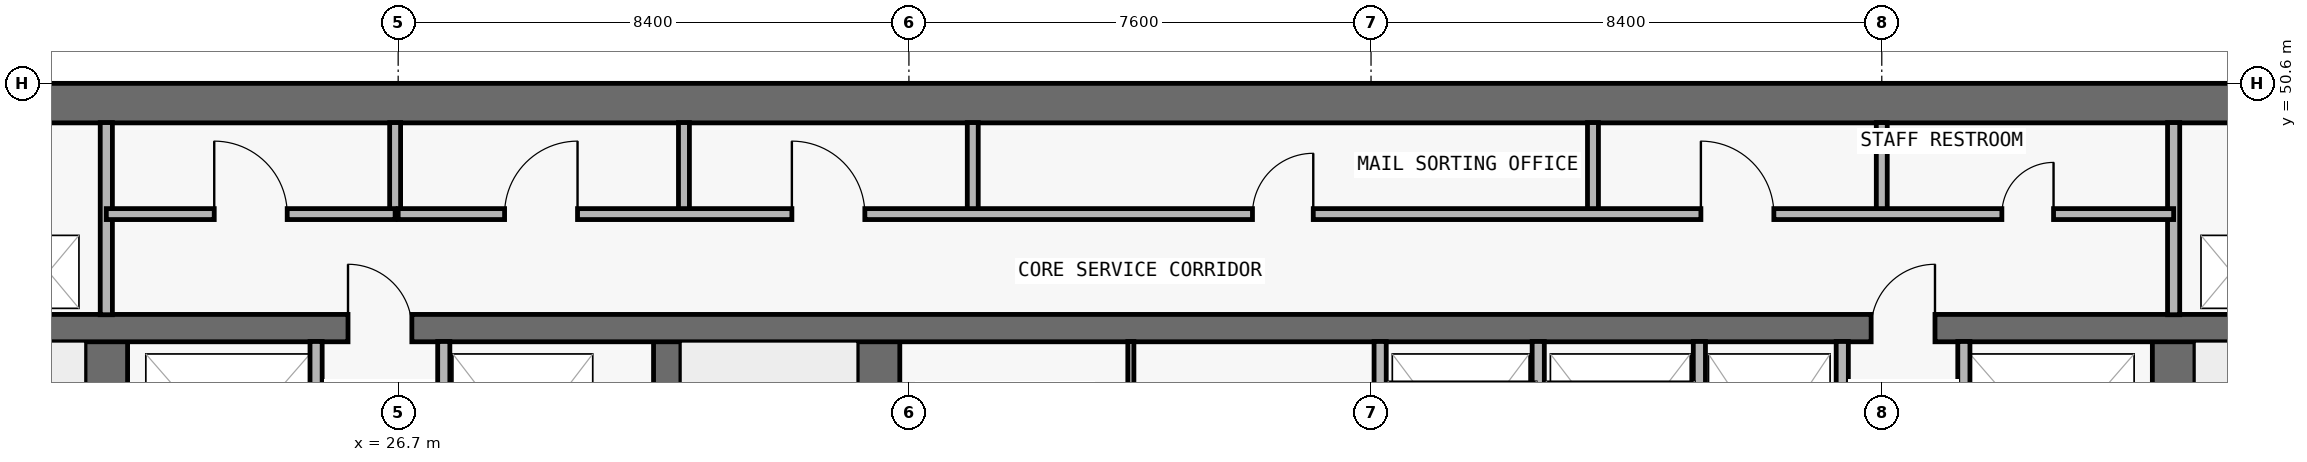
"""IFC4 building model, lengths in metres.
Left out: names, types, materials, properties, quantities, classifications, styles, units other than length and angle.
Written with IfcOpenShell. Run it as: python <this file> out.ifc"""

import sys

from ifc_helpers import new_model, si_unit, direction, frame, frame_2d, origin, place, context, subcontext, project, spatial, rectangle, extrude, element, fill, save


model = new_model("IFC4")
c1 = context("Model", 3, precision=1e-05, world=origin(), true_north=direction((0.0, 1.0)))
c2 = subcontext(c1, "Body", "Model", "MODEL_VIEW")
j1 = project(units=[si_unit("LENGTHUNIT", "METRE"), si_unit("PLANEANGLEUNIT", "RADIAN")], contexts=[c1])
p1 = place(None, origin())
s1 = spatial("IfcSite", under=j1, at=p1, CompositionType="ELEMENT")
p2 = place(p1, origin())
s2 = spatial("IfcBuilding", under=s1, at=p2, CompositionType="ELEMENT")
p3 = place(p2, frame((0.0, 0.0, 148.8)))
s3 = spatial("IfcBuildingStorey", under=s2, at=p3, CompositionType="ELEMENT", Elevation=148.8)
p4 = place(p3, frame((17.85, 50.275, 0.0), z_axis=(0.0, 0.0, 1.0), x_axis=(1.0, 0.0, 0.0)))
e1 = element("IfcWall", 1, at=p4, inside=s3, PredefinedType="SHEAR", context=c2, shape_type="SweptSolid", body=[
    extrude(rectangle(XDim=42.1, YDim=0.65, at=frame_2d((21.05, 0.0))), origin(), (0.0, 0.0, 1.0), 3.0),
])
p5 = place(p3, frame((21.9, 36.95, 0.0), z_axis=(0.0, 0.0, 1.0), x_axis=(0.0, 1.0, 0.0)))
e2 = element("IfcWall", 2, at=p5, inside=s3, PredefinedType="SHEAR", context=c2, shape_type="SweptSolid", body=[
    extrude(rectangle(XDim=9.625, YDim=0.7, at=frame_2d((4.812, 0.0))), origin(), (0.0, 0.0, 1.0), 3.0),
])
p6 = place(p5, frame((0.6, 0.0, 0.0)))
e3 = element("IfcOpeningElement", 3, at=p6, cuts=e2, PredefinedType="OPENING", context=c2, shape_type="SweptSolid", body=[
    extrude(rectangle(XDim=1.1, YDim=2.15, at=frame_2d((0.55, 1.075))), frame((0.0, 0.36, 0.0), z_axis=(0.0, -1.0, 0.0), x_axis=(1.0, 0.0, 0.0)), (0.0, 0.0, 1.0), 0.72),
])
p7 = place(p3, frame((55.9, 36.95, 0.0), z_axis=(0.0, 0.0, 1.0), x_axis=(0.0, 1.0, 0.0)))
e4 = element("IfcWall", 4, at=p7, inside=s3, PredefinedType="SHEAR", context=c2, shape_type="SweptSolid", body=[
    extrude(rectangle(XDim=9.625, YDim=0.7, at=frame_2d((4.812, 0.0))), origin(), (0.0, 0.0, 1.0), 3.0),
])
p8 = place(p7, frame((0.6, 0.0, 0.0)))
e5 = element("IfcOpeningElement", 5, at=p8, cuts=e4, PredefinedType="OPENING", context=c2, shape_type="SweptSolid", body=[
    extrude(rectangle(XDim=1.1, YDim=2.15, at=frame_2d((0.55, 1.075))), frame((0.0, 0.36, 0.0), z_axis=(0.0, -1.0, 0.0), x_axis=(1.0, 0.0, 0.0)), (0.0, 0.0, 1.0), 0.72),
])
p9 = place(p3, frame((31.125, 36.95, 0.0), z_axis=(0.0, 0.0, 1.0), x_axis=(0.0, 1.0, 0.0)))
e6 = element("IfcWall", 6, at=p9, inside=s3, PredefinedType="SHEAR", context=c2, shape_type="SweptSolid", body=[
    extrude(rectangle(XDim=9.625, YDim=0.45, at=frame_2d((4.812, 0.0))), origin(), (0.0, 0.0, 1.0), 3.0),
])
p10 = place(p3, frame((34.6, 36.95, 0.0), z_axis=(0.0, 0.0, 1.0), x_axis=(0.0, 1.0, 0.0)))
e7 = element("IfcWall", 7, at=p10, inside=s3, PredefinedType="SHEAR", context=c2, shape_type="SweptSolid", body=[
    extrude(rectangle(XDim=9.625, YDim=0.7, at=frame_2d((4.812, 0.0))), origin(), (0.0, 0.0, 1.0), 3.0),
])
p11 = place(p3, frame((18.25, 46.575, 0.0), z_axis=(0.0, 0.0, 1.0), x_axis=(1.0, 0.0, 0.0)))
e8 = element("IfcWall", 8, at=p11, inside=s3, PredefinedType="SHEAR", context=c2, shape_type="SweptSolid", body=[
    extrude(rectangle(XDim=41.3, YDim=0.45, at=frame_2d((20.65, 0.0))), origin(), (0.0, 0.0, 1.0), 3.0),
])
p12 = place(p11, frame((7.625, 0.0, 0.0)))
e9 = element("IfcOpeningElement", 9, at=p12, cuts=e8, PredefinedType="OPENING", context=c2, shape_type="SweptSolid", body=[
    extrude(rectangle(XDim=1.05, YDim=2.15, at=frame_2d((0.525, 1.075))), frame((0.0, 0.235, 0.0), z_axis=(0.0, -1.0, 0.0), x_axis=(1.0, 0.0, 0.0)), (0.0, 0.0, 1.0), 0.47),
])
p13 = place(p11, frame((32.675, 0.0, 0.0)))
e10 = element("IfcOpeningElement", 10, at=p13, cuts=e8, PredefinedType="OPENING", context=c2, shape_type="SweptSolid", body=[
    extrude(rectangle(XDim=1.05, YDim=2.15, at=frame_2d((0.525, 1.075))), frame((0.0, 0.235, 0.0), z_axis=(0.0, -1.0, 0.0), x_axis=(1.0, 0.0, 0.0)), (0.0, 0.0, 1.0), 0.47),
])
p14 = place(p3, frame((21.9, 46.795, 0.0), z_axis=(0.0, 0.0, 1.0), x_axis=(0.0, 1.0, 0.0)))
e11 = element("IfcWall", 11, at=p14, inside=s3, PredefinedType="PARTITIONING", context=c2, shape_type="SweptSolid", body=[
    extrude(rectangle(XDim=3.16, YDim=0.2, at=frame_2d((1.58, 0.0))), origin(), (0.0, 0.0, 1.0), 3.0),
])
p15 = place(p3, frame((25.35, 43.17, 0.0), z_axis=(0.0, 0.0, 1.0), x_axis=(0.0, 1.0, 0.0)))
e12 = element("IfcWall", 12, at=p15, inside=s3, PredefinedType="PARTITIONING", context=c2, shape_type="SweptSolid", body=[
    extrude(rectangle(XDim=3.185, YDim=0.2, at=frame_2d((1.593, 0.0))), origin(), (0.0, 0.0, 1.0), 3.0),
])
p16 = place(p3, frame((26.65, 48.45, 0.0), z_axis=(0.0, 0.0, 1.0), x_axis=(0.0, 1.0, 0.0)))
e13 = element("IfcWall", 13, at=p16, inside=s3, PredefinedType="PARTITIONING", context=c2, shape_type="SweptSolid", body=[
    extrude(rectangle(XDim=1.505, YDim=0.18, at=frame_2d((0.752, 0.0))), origin(), (0.0, 0.0, 1.0), 3.0),
])
p17 = place(p3, frame((27.45, 43.17, 0.0), z_axis=(0.0, 0.0, 1.0), x_axis=(0.0, 1.0, 0.0)))
e14 = element("IfcWall", 14, at=p17, inside=s3, PredefinedType="PARTITIONING", context=c2, shape_type="SweptSolid", body=[
    extrude(rectangle(XDim=3.185, YDim=0.2, at=frame_2d((1.593, 0.0))), origin(), (0.0, 0.0, 1.0), 3.0),
])
for number, where, z_axis, x_axis in (
    (15, (31.4, 48.45, 0.0), (0.0, 0.0, 1.0), (0.0, 1.0, 0.0)),
    (16, (36.15, 48.45, 0.0), (0.0, 0.0, 1.0), (0.0, 1.0, 0.0)),
):
    element("IfcWall", number, at=place(p3, frame(where, z_axis=z_axis, x_axis=x_axis)), inside=s3, PredefinedType="PARTITIONING", context=c2, shape_type="SweptSolid", body=[
        extrude(rectangle(XDim=1.505, YDim=0.18, at=frame_2d((0.752, 0.0))), origin(), (0.0, 0.0, 1.0), 3.0),
    ])
p18 = place(p3, frame((38.75, 43.17, 0.0), z_axis=(0.0, 0.0, 1.0), x_axis=(0.0, 1.0, 0.0)))
e17 = element("IfcWall", 17, at=p18, inside=s3, PredefinedType="MOVABLE", context=c2, shape_type="SweptSolid", body=[
    extrude(rectangle(XDim=3.185, YDim=0.1, at=frame_2d((1.593, 0.0))), origin(), (0.0, 0.0, 1.0), 3.0),
])
for number, where, z_axis, x_axis in (
    (18, (42.85, 43.17, 0.0), (0.0, 0.0, 1.0), (0.0, 1.0, 0.0)),
    (19, (45.45, 43.17, 0.0), (0.0, 0.0, 1.0), (0.0, 1.0, 0.0)),
):
    element("IfcWall", number, at=place(p3, frame(where, z_axis=z_axis, x_axis=x_axis)), inside=s3, PredefinedType="PARTITIONING", context=c2, shape_type="SweptSolid", body=[
        extrude(rectangle(XDim=3.185, YDim=0.2, at=frame_2d((1.593, 0.0))), origin(), (0.0, 0.0, 1.0), 3.0),
    ])
p19 = place(p3, frame((46.35, 48.45, 0.0), z_axis=(0.0, 0.0, 1.0), x_axis=(0.0, 1.0, 0.0)))
e20 = element("IfcWall", 20, at=p19, inside=s3, PredefinedType="PARTITIONING", context=c2, shape_type="SweptSolid", body=[
    extrude(rectangle(XDim=1.505, YDim=0.18, at=frame_2d((0.752, 0.0))), origin(), (0.0, 0.0, 1.0), 3.0),
])
for number, where, z_axis, x_axis in (
    (21, (48.1, 43.17, 0.0), (0.0, 0.0, 1.0), (0.0, 1.0, 0.0)),
    (22, (50.45, 43.17, 0.0), (0.0, 0.0, 1.0), (0.0, 1.0, 0.0)),
):
    element("IfcWall", number, at=place(p3, frame(where, z_axis=z_axis, x_axis=x_axis)), inside=s3, PredefinedType="PARTITIONING", context=c2, shape_type="SweptSolid", body=[
        extrude(rectangle(XDim=3.185, YDim=0.2, at=frame_2d((1.593, 0.0))), origin(), (0.0, 0.0, 1.0), 3.0),
    ])
p20 = place(p3, frame((51.1, 48.45, 0.0), z_axis=(0.0, 0.0, 1.0), x_axis=(0.0, 1.0, 0.0)))
e23 = element("IfcWall", 23, at=p20, inside=s3, PredefinedType="PARTITIONING", context=c2, shape_type="SweptSolid", body=[
    extrude(rectangle(XDim=1.505, YDim=0.18, at=frame_2d((0.752, 0.0))), origin(), (0.0, 0.0, 1.0), 3.0),
])
p21 = place(p3, frame((52.45, 43.17, 0.0), z_axis=(0.0, 0.0, 1.0), x_axis=(0.0, 1.0, 0.0)))
e24 = element("IfcWall", 24, at=p21, inside=s3, PredefinedType="PARTITIONING", context=c2, shape_type="SweptSolid", body=[
    extrude(rectangle(XDim=3.185, YDim=0.2, at=frame_2d((1.593, 0.0))), origin(), (0.0, 0.0, 1.0), 3.0),
])
p22 = place(p3, frame((55.9, 46.795, 0.0), z_axis=(0.0, 0.0, 1.0), x_axis=(0.0, 1.0, 0.0)))
e25 = element("IfcWall", 25, at=p22, inside=s3, PredefinedType="PARTITIONING", context=c2, shape_type="SweptSolid", body=[
    extrude(rectangle(XDim=3.16, YDim=0.2, at=frame_2d((1.58, 0.0))), origin(), (0.0, 0.0, 1.0), 3.0),
])
p23 = place(p3, frame((21.9, 48.45, 0.0), z_axis=(0.0, 0.0, 1.0), x_axis=(1.0, 0.0, 0.0)))
e26 = element("IfcWall", 26, at=p23, inside=s3, PredefinedType="PARTITIONING", context=c2, shape_type="SweptSolid", body=[
    extrude(rectangle(XDim=4.75, YDim=0.18, at=frame_2d((2.375, 0.0))), origin(), (0.0, 0.0, 1.0), 3.0),
])
p24 = place(p23, frame((1.775, 0.0, 0.0)))
e27 = element("IfcOpeningElement", 27, at=p24, cuts=e26, PredefinedType="OPENING", context=c2, shape_type="SweptSolid", body=[
    extrude(rectangle(XDim=1.2, YDim=2.2, at=frame_2d((0.6, 1.1))), frame((0.0, 0.1, 0.0), z_axis=(0.0, -1.0, 0.0), x_axis=(1.0, 0.0, 0.0)), (0.0, 0.0, 1.0), 0.2),
])
p25 = place(p3, frame((26.7, 48.45, 0.0), z_axis=(0.0, 0.0, 1.0), x_axis=(1.0, 0.0, 0.0)))
e28 = element("IfcWall", 28, at=p25, inside=s3, PredefinedType="PARTITIONING", context=c2, shape_type="SweptSolid", body=[
    extrude(rectangle(XDim=29.2, YDim=0.18, at=frame_2d((14.6, 0.0))), origin(), (0.0, 0.0, 1.0), 3.0),
])
p26 = place(p25, frame((1.75, 0.0, 0.0)))
e29 = element("IfcOpeningElement", 29, at=p26, cuts=e28, PredefinedType="OPENING", context=c2, shape_type="SweptSolid", body=[
    extrude(rectangle(XDim=1.2, YDim=2.2, at=frame_2d((0.6, 1.1))), frame((0.0, 0.1, 0.0), z_axis=(0.0, -1.0, 0.0), x_axis=(1.0, 0.0, 0.0)), (0.0, 0.0, 1.0), 0.2),
])
p27 = place(p25, frame((6.475, 0.0, 0.0)))
e30 = element("IfcOpeningElement", 30, at=p27, cuts=e28, PredefinedType="OPENING", context=c2, shape_type="SweptSolid", body=[
    extrude(rectangle(XDim=1.2, YDim=2.2, at=frame_2d((0.6, 1.1))), frame((0.0, 0.1, 0.0), z_axis=(0.0, -1.0, 0.0), x_axis=(1.0, 0.0, 0.0)), (0.0, 0.0, 1.0), 0.2),
])
p28 = place(p25, frame((14.05, 0.0, 0.0)))
e31 = element("IfcOpeningElement", 31, at=p28, cuts=e28, PredefinedType="OPENING", context=c2, shape_type="SweptSolid", body=[
    extrude(rectangle(XDim=1.0, YDim=2.2, at=frame_2d((0.5, 1.1))), frame((0.0, 0.1, 0.0), z_axis=(0.0, -1.0, 0.0), x_axis=(1.0, 0.0, 0.0)), (0.0, 0.0, 1.0), 0.2),
])
p29 = place(p25, frame((21.425, 0.0, 0.0)))
e32 = element("IfcOpeningElement", 32, at=p29, cuts=e28, PredefinedType="OPENING", context=c2, shape_type="SweptSolid", body=[
    extrude(rectangle(XDim=1.2, YDim=2.2, at=frame_2d((0.6, 1.1))), frame((0.0, 0.1, 0.0), z_axis=(0.0, -1.0, 0.0), x_axis=(1.0, 0.0, 0.0)), (0.0, 0.0, 1.0), 0.2),
])
p30 = place(p25, frame((26.375, 0.0, 0.0)))
e33 = element("IfcOpeningElement", 33, at=p30, cuts=e28, PredefinedType="OPENING", context=c2, shape_type="SweptSolid", body=[
    extrude(rectangle(XDim=0.85, YDim=2.1, at=frame_2d((0.425, 1.05))), frame((0.0, 0.1, 0.0), z_axis=(0.0, -1.0, 0.0), x_axis=(1.0, 0.0, 0.0)), (0.0, 0.0, 1.0), 0.2),
])
p31 = place(p12, origin())
e34 = element("IfcDoor", 34, at=p31, inside=s3, OperationType="SINGLE_SWING_LEFT", PredefinedType="DOOR", context=c2, shape_type="SweptSolid", body=[
    extrude(rectangle(XDim=1.05, YDim=2.15, at=frame_2d((0.525, 1.075))), frame((0.0, 0.025, 0.0), z_axis=(0.0, -1.0, 0.0), x_axis=(1.0, 0.0, 0.0)), (0.0, 0.0, 1.0), 0.05),
])
fill(e9, e34)
p32 = place(p13, origin())
e35 = element("IfcDoor", 35, at=p32, inside=s3, OperationType="SINGLE_SWING_RIGHT", PredefinedType="DOOR", context=c2, shape_type="SweptSolid", body=[
    extrude(rectangle(XDim=1.05, YDim=2.15, at=frame_2d((0.525, 1.075))), frame((0.0, 0.025, 0.0), z_axis=(0.0, -1.0, 0.0), x_axis=(1.0, 0.0, 0.0)), (0.0, 0.0, 1.0), 0.05),
])
fill(e10, e35)
p33 = place(p24, origin())
e36 = element("IfcDoor", 36, at=p33, inside=s3, OperationType="SINGLE_SWING_LEFT", PredefinedType="DOOR", context=c2, shape_type="SweptSolid", body=[
    extrude(rectangle(XDim=1.2, YDim=2.2, at=frame_2d((0.6, 1.1))), frame((0.0, 0.025, 0.0), z_axis=(0.0, -1.0, 0.0), x_axis=(1.0, 0.0, 0.0)), (0.0, 0.0, 1.0), 0.05),
])
fill(e27, e36)
p34 = place(p26, origin())
e37 = element("IfcDoor", 37, at=p34, inside=s3, OperationType="SINGLE_SWING_RIGHT", PredefinedType="DOOR", context=c2, shape_type="SweptSolid", body=[
    extrude(rectangle(XDim=1.2, YDim=2.2, at=frame_2d((0.6, 1.1))), frame((0.0, 0.025, 0.0), z_axis=(0.0, -1.0, 0.0), x_axis=(1.0, 0.0, 0.0)), (0.0, 0.0, 1.0), 0.05),
])
fill(e29, e37)
p35 = place(p27, origin())
e38 = element("IfcDoor", 38, at=p35, inside=s3, OperationType="SINGLE_SWING_LEFT", PredefinedType="DOOR", context=c2, shape_type="SweptSolid", body=[
    extrude(rectangle(XDim=1.2, YDim=2.2, at=frame_2d((0.6, 1.1))), frame((0.0, 0.025, 0.0), z_axis=(0.0, -1.0, 0.0), x_axis=(1.0, 0.0, 0.0)), (0.0, 0.0, 1.0), 0.05),
])
fill(e30, e38)
p36 = place(p28, origin())
e39 = element("IfcDoor", 39, at=p36, inside=s3, OperationType="SINGLE_SWING_RIGHT", PredefinedType="DOOR", context=c2, shape_type="SweptSolid", body=[
    extrude(rectangle(XDim=1.0, YDim=2.2, at=frame_2d((0.5, 1.1))), frame((0.0, 0.025, 0.0), z_axis=(0.0, -1.0, 0.0), x_axis=(1.0, 0.0, 0.0)), (0.0, 0.0, 1.0), 0.05),
])
fill(e31, e39)
p37 = place(p29, origin())
e40 = element("IfcDoor", 40, at=p37, inside=s3, OperationType="SINGLE_SWING_LEFT", PredefinedType="DOOR", context=c2, shape_type="SweptSolid", body=[
    extrude(rectangle(XDim=1.2, YDim=2.2, at=frame_2d((0.6, 1.1))), frame((0.0, 0.025, 0.0), z_axis=(0.0, -1.0, 0.0), x_axis=(1.0, 0.0, 0.0)), (0.0, 0.0, 1.0), 0.05),
])
fill(e32, e40)
p38 = place(p30, origin())
e41 = element("IfcDoor", 41, at=p38, inside=s3, OperationType="SINGLE_SWING_RIGHT", PredefinedType="DOOR", context=c2, shape_type="SweptSolid", body=[
    extrude(rectangle(XDim=0.85, YDim=2.1, at=frame_2d((0.425, 1.05))), frame((0.0, 0.025, 0.0), z_axis=(0.0, -1.0, 0.0), x_axis=(1.0, 0.0, 0.0)), (0.0, 0.0, 1.0), 0.05),
])
fill(e33, e41)
save(model, sys.argv[1])
